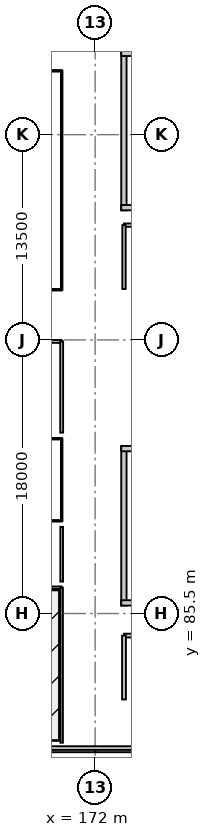
"""IFC4 building model, lengths in metres.
Left out: names, types, materials, properties, quantities, classifications, styles, units other than length and angle.
Written with IfcOpenShell. Run it as: python <this file> out.ifc"""

import sys

from ifc_helpers import new_model, si_unit, direction, frame, frame_2d, origin, origin_2d, place, context, subcontext, project, spatial, rectangle, i_section, extrude, element, fill, save


model = new_model("IFC4")
c1 = context("Model", 3, precision=1e-05, world=origin(), true_north=direction((0.0, 1.0)))
c2 = subcontext(c1, "Body", "Model", "MODEL_VIEW")
j1 = project(units=[si_unit("LENGTHUNIT", "METRE"), si_unit("PLANEANGLEUNIT", "RADIAN")], contexts=[c1])
p1 = place(None, origin())
s1 = spatial("IfcSite", under=j1, at=p1, CompositionType="ELEMENT")
p2 = place(p1, origin())
s2 = spatial("IfcBuilding", under=s1, at=p2, CompositionType="ELEMENT")
p3 = place(p2, frame((0.0, 0.0, 20.8)))
s3 = spatial("IfcBuildingStorey", under=s2, at=p3, CompositionType="ELEMENT", Elevation=20.8)
for number, where, z_axis, x_axis in (
    (1, (172.0, 76.5, 0.0), (0.0, 0.0, 1.0), (1.0, 0.0, 0.0)),
    (2, (172.0, 85.5, 0.0), (0.0, 0.0, 1.0), (1.0, 0.0, 0.0)),
    (3, (172.0, 94.5, 0.0), (0.0, 0.0, 1.0), (1.0, 0.0, 0.0)),
    (4, (172.0, 103.5, 0.0), (0.0, 0.0, 1.0), (1.0, 0.0, 0.0)),
    (5, (172.0, 117.0, 0.0), (0.0, 0.0, 1.0), (1.0, 0.0, 0.0)),
):
    element("IfcColumn", number, at=place(p3, frame(where, z_axis=z_axis, x_axis=x_axis)), inside=s3, PredefinedType="COLUMN", context=c2, shape_type="SweptSolid", body=[
        extrude(i_section(OverallWidth=0.3, OverallDepth=0.3, WebThickness=0.01, FlangeThickness=0.015, FilletRadius=0.018, at=origin_2d()), origin(), (0.0, 0.0, 1.0), 2.85),
    ])
p4 = place(p3, frame((179.995, 76.5, 0.0), z_axis=(0.0, 0.0, 1.0), x_axis=(-1.0, 0.0, 0.0)))
e6 = element("IfcWall", 6, at=p4, inside=s3, PredefinedType="SOLIDWALL", context=c2, shape_type="SweptSolid", body=[
    extrude(rectangle(XDim=7.99, YDim=0.245, at=frame_2d((3.995, 0.0))), origin(), (0.0, 0.0, 1.0), 2.23),
])
p5 = place(p4, frame((3.42, 0.0, 0.7)))
e7 = element("IfcOpeningElement", 7, at=p5, cuts=e6, PredefinedType="OPENING", context=c2, shape_type="SweptSolid", body=[
    extrude(rectangle(XDim=1.15, YDim=1.45, at=frame_2d((0.575, 0.725))), frame((0.0, 0.133, 0.0), z_axis=(0.0, -1.0, 0.0), x_axis=(1.0, 0.0, 0.0)), (0.0, 0.0, 1.0), 0.265),
])
p6 = place(p3, frame((171.995, 76.5, 0.0), z_axis=(0.0, 0.0, 1.0), x_axis=(-1.0, 0.0, 0.0)))
e8 = element("IfcWall", 8, at=p6, inside=s3, PredefinedType="SOLIDWALL", context=c2, shape_type="SweptSolid", body=[
    extrude(rectangle(XDim=8.99, YDim=0.245, at=frame_2d((4.495, 0.0))), origin(), (0.0, 0.0, 1.0), 2.23),
])
p7 = place(p6, frame((1.86, 0.0, 0.7)))
e9 = element("IfcOpeningElement", 9, at=p7, cuts=e8, PredefinedType="OPENING", context=c2, shape_type="SweptSolid", body=[
    extrude(rectangle(XDim=1.15, YDim=1.45, at=frame_2d((0.575, 0.725))), frame((0.0, 0.133, 0.0), z_axis=(0.0, -1.0, 0.0), x_axis=(1.0, 0.0, 0.0)), (0.0, 0.0, 1.0), 0.265),
])
p8 = place(p6, frame((5.98, 0.0, 0.7)))
e10 = element("IfcOpeningElement", 10, at=p8, cuts=e8, PredefinedType="OPENING", context=c2, shape_type="SweptSolid", body=[
    extrude(rectangle(XDim=1.15, YDim=1.45, at=frame_2d((0.575, 0.725))), frame((0.0, 0.133, 0.0), z_axis=(0.0, -1.0, 0.0), x_axis=(1.0, 0.0, 0.0)), (0.0, 0.0, 1.0), 0.265),
])
p9 = place(p3, frame((163.15, 76.65, 2.85), z_axis=(0.0, 0.0, 1.0), x_axis=(1.0, 0.0, 0.0)))
e11 = element("IfcWall", 11, at=p9, inside=s3, PredefinedType="PARAPET", context=c2, shape_type="SweptSolid", body=[
    extrude(rectangle(XDim=24.7, YDim=0.24, at=frame_2d((12.35, 0.0))), origin(), (0.0, 0.0, 1.0), 0.34),
])
p10 = place(p3, frame((173.893, 96.522, 0.0), z_axis=(0.0, 0.0, 1.0), x_axis=(0.0, -1.0, 0.0)))
e12 = element("IfcWall", 12, at=p10, inside=s3, PredefinedType="SHEAR", context=c2, shape_type="SweptSolid", body=[
    extrude(rectangle(XDim=10.498, YDim=0.35, at=frame_2d((5.249, 0.0))), origin(), (0.0, 0.0, 1.0), 2.645),
])
p11 = place(p3, frame((178.038, 96.347, 0.0), z_axis=(0.0, 0.0, 1.0), x_axis=(-1.0, 0.0, 0.0)))
e13 = element("IfcWall", 13, at=p11, inside=s3, PredefinedType="SHEAR", context=c2, shape_type="SweptSolid", body=[
    extrude(rectangle(XDim=4.32, YDim=0.35, at=frame_2d((2.16, 0.0))), origin(), (0.0, 0.0, 1.0), 2.645),
])
p12 = place(p3, frame((173.718, 86.2, 0.0), z_axis=(0.0, 0.0, 1.0), x_axis=(1.0, 0.0, 0.0)))
e14 = element("IfcWall", 14, at=p12, inside=s3, PredefinedType="SHEAR", context=c2, shape_type="SweptSolid", body=[
    extrude(rectangle(XDim=4.32, YDim=0.35, at=frame_2d((2.16, 0.0))), origin(), (0.0, 0.0, 1.0), 2.645),
])
p13 = place(p12, frame((1.15, 0.0, 0.0)))
e15 = element("IfcOpeningElement", 15, at=p13, cuts=e14, PredefinedType="OPENING", context=c2, shape_type="SweptSolid", body=[
    extrude(rectangle(XDim=1.3, YDim=2.1, at=frame_2d((0.65, 1.05))), frame((0.0, 0.185, 0.0), z_axis=(0.0, -1.0, 0.0), x_axis=(1.0, 0.0, 0.0)), (0.0, 0.0, 1.0), 0.37),
])
p14 = place(p3, frame((173.893, 122.522, 0.0), z_axis=(0.0, 0.0, 1.0), x_axis=(0.0, -1.0, 0.0)))
e16 = element("IfcWall", 16, at=p14, inside=s3, PredefinedType="SHEAR", context=c2, shape_type="SweptSolid", body=[
    extrude(rectangle(XDim=10.498, YDim=0.35, at=frame_2d((5.249, 0.0))), origin(), (0.0, 0.0, 1.0), 2.645),
])
p15 = place(p3, frame((178.038, 122.347, 0.0), z_axis=(0.0, 0.0, 1.0), x_axis=(-1.0, 0.0, 0.0)))
e17 = element("IfcWall", 17, at=p15, inside=s3, PredefinedType="SHEAR", context=c2, shape_type="SweptSolid", body=[
    extrude(rectangle(XDim=4.32, YDim=0.35, at=frame_2d((2.16, 0.0))), origin(), (0.0, 0.0, 1.0), 2.645),
])
p16 = place(p3, frame((173.718, 112.2, 0.0), z_axis=(0.0, 0.0, 1.0), x_axis=(1.0, 0.0, 0.0)))
e18 = element("IfcWall", 18, at=p16, inside=s3, PredefinedType="SHEAR", context=c2, shape_type="SweptSolid", body=[
    extrude(rectangle(XDim=4.32, YDim=0.35, at=frame_2d((2.16, 0.0))), origin(), (0.0, 0.0, 1.0), 2.645),
])
p17 = place(p16, frame((1.15, 0.0, 0.0)))
e19 = element("IfcOpeningElement", 19, at=p17, cuts=e18, PredefinedType="OPENING", context=c2, shape_type="SweptSolid", body=[
    extrude(rectangle(XDim=1.3, YDim=2.1, at=frame_2d((0.65, 1.05))), frame((0.0, 0.185, 0.0), z_axis=(0.0, -1.0, 0.0), x_axis=(1.0, 0.0, 0.0)), (0.0, 0.0, 1.0), 0.37),
])
p18 = place(p3, frame((169.8, 106.8, 0.0), z_axis=(0.0, 0.0, 1.0), x_axis=(-1.0, 0.0, 0.0)))
e20 = element("IfcWall", 20, at=p18, inside=s3, PredefinedType="PARTITIONING", context=c2, shape_type="SweptSolid", body=[
    extrude(rectangle(XDim=6.2, YDim=0.1, at=frame_2d((3.1, 0.0))), origin(), (0.0, 0.0, 1.0), 2.18),
])
p19 = place(p3, frame((163.6, 121.2, 0.0), z_axis=(0.0, 0.0, 1.0), x_axis=(1.0, 0.0, 0.0)))
e21 = element("IfcWall", 21, at=p19, inside=s3, PredefinedType="PARTITIONING", context=c2, shape_type="SweptSolid", body=[
    extrude(rectangle(XDim=6.2, YDim=0.1, at=frame_2d((3.1, 0.0))), origin(), (0.0, 0.0, 1.0), 2.23),
])
p20 = place(p3, frame((169.8, 121.2, 0.0), z_axis=(0.0, 0.0, 1.0), x_axis=(0.0, -1.0, 0.0)))
e22 = element("IfcWall", 22, at=p20, inside=s3, PredefinedType="PARTITIONING", context=c2, shape_type="SweptSolid", body=[
    extrude(rectangle(XDim=14.4, YDim=0.1, at=frame_2d((7.2, 0.0))), origin(), (0.0, 0.0, 1.0), 2.23),
])
p21 = place(p20, frame((6.575, 0.0, 0.0)))
e23 = element("IfcOpeningElement", 23, at=p21, cuts=e22, PredefinedType="OPENING", context=c2, shape_type="SweptSolid", body=[
    extrude(rectangle(XDim=1.25, YDim=2.1, at=frame_2d((0.625, 1.05))), frame((0.0, 0.06, 0.0), z_axis=(0.0, -1.0, 0.0), x_axis=(1.0, 0.0, 0.0)), (0.0, 0.0, 1.0), 0.12),
])
p22 = place(p20, frame((10.944, 0.0, 0.0)))
e24 = element("IfcOpeningElement", 24, at=p22, cuts=e22, PredefinedType="OPENING", context=c2, shape_type="SweptSolid", body=[
    extrude(rectangle(XDim=1.25, YDim=2.1, at=frame_2d((0.625, 1.05))), frame((0.0, 0.06, 0.0), z_axis=(0.0, -1.0, 0.0), x_axis=(1.0, 0.0, 0.0)), (0.0, 0.0, 1.0), 0.12),
])
p23 = place(p3, frame((163.4, 87.2, 0.0), z_axis=(0.0, 0.0, 1.0), x_axis=(1.0, 0.0, 0.0)))
e25 = element("IfcWall", 25, at=p23, inside=s3, PredefinedType="PARTITIONING", context=c2, shape_type="SweptSolid", body=[
    extrude(rectangle(XDim=6.4, YDim=0.16, at=frame_2d((3.2, 0.0))), origin(), (0.0, 0.0, 1.0), 2.23),
])
p24 = place(p3, frame((169.8, 87.2, 0.0), z_axis=(0.0, 0.0, 1.0), x_axis=(0.0, -1.0, 0.0)))
e26 = element("IfcWall", 26, at=p24, inside=s3, PredefinedType="PARTITIONING", context=c2, shape_type="SweptSolid", body=[
    extrude(rectangle(XDim=10.2, YDim=0.16, at=frame_2d((5.1, 0.0))), origin(), (0.0, 0.0, 1.0), 2.23),
])
p25 = place(p24, frame((4.575, 0.0, 0.0)))
e27 = element("IfcOpeningElement", 27, at=p25, cuts=e26, PredefinedType="OPENING", context=c2, shape_type="SweptSolid", body=[
    extrude(rectangle(XDim=1.05, YDim=2.1, at=frame_2d((0.525, 1.05))), frame((0.0, 0.09, 0.0), z_axis=(0.0, -1.0, 0.0), x_axis=(1.0, 0.0, 0.0)), (0.0, 0.0, 1.0), 0.18),
])
for number, where, z_axis, x_axis in (
    (28, (169.8, 91.6, 0.0), (0.0, 0.0, 1.0), (-1.0, 0.0, 0.0)),
    (29, (163.4, 97.0, 0.0), (0.0, 0.0, 1.0), (1.0, 0.0, 0.0)),
):
    element("IfcWall", number, at=place(p3, frame(where, z_axis=z_axis, x_axis=x_axis)), inside=s3, PredefinedType="PARTITIONING", context=c2, shape_type="SweptSolid", body=[
        extrude(rectangle(XDim=6.4, YDim=0.1, at=frame_2d((3.2, 0.0))), origin(), (0.0, 0.0, 1.0), 2.23),
    ])
p26 = place(p3, frame((169.8, 97.0, 0.0), z_axis=(0.0, 0.0, 1.0), x_axis=(0.0, -1.0, 0.0)))
e30 = element("IfcWall", 30, at=p26, inside=s3, PredefinedType="PARTITIONING", context=c2, shape_type="SweptSolid", body=[
    extrude(rectangle(XDim=5.4, YDim=0.1, at=frame_2d((2.7, 0.0))), origin(), (0.0, 0.0, 1.0), 2.23),
])
p27 = place(p26, frame((2.25, 0.0, 0.0)))
e31 = element("IfcOpeningElement", 31, at=p27, cuts=e30, PredefinedType="OPENING", context=c2, shape_type="SweptSolid", body=[
    extrude(rectangle(XDim=0.9, YDim=2.1, at=frame_2d((0.45, 1.05))), frame((0.0, 0.06, 0.0), z_axis=(0.0, -1.0, 0.0), x_axis=(1.0, 0.0, 0.0)), (0.0, 0.0, 1.0), 0.12),
])
p28 = place(p3, frame((163.4, 103.4, 0.0), z_axis=(0.0, 0.0, 1.0), x_axis=(1.0, 0.0, 0.0)))
e32 = element("IfcWall", 32, at=p28, inside=s3, PredefinedType="PARTITIONING", context=c2, shape_type="SweptSolid", body=[
    extrude(rectangle(XDim=6.4, YDim=0.19, at=frame_2d((3.2, 0.0))), origin(), (0.0, 0.0, 1.0), 2.18),
])
p29 = place(p3, frame((169.8, 103.4, 0.0), z_axis=(0.0, 0.0, 1.0), x_axis=(0.0, -1.0, 0.0)))
e33 = element("IfcWall", 33, at=p29, inside=s3, PredefinedType="PARTITIONING", context=c2, shape_type="SweptSolid", body=[
    extrude(rectangle(XDim=6.0, YDim=0.19, at=frame_2d((3.0, 0.0))), origin(), (0.0, 0.0, 1.0), 2.23),
])
p30 = place(p29, frame((2.55, 0.0, 0.0)))
e34 = element("IfcOpeningElement", 34, at=p30, cuts=e33, PredefinedType="OPENING", context=c2, shape_type="SweptSolid", body=[
    extrude(rectangle(XDim=0.9, YDim=2.1, at=frame_2d((0.45, 1.05))), frame((0.0, 0.105, 0.0), z_axis=(0.0, -1.0, 0.0), x_axis=(1.0, 0.0, 0.0)), (0.0, 0.0, 1.0), 0.21),
])
p31 = place(p3, frame((169.8, 91.2, 0.0), z_axis=(0.0, 0.0, 1.0), x_axis=(0.0, -1.0, 0.0)))
e35 = element("IfcWall", 35, at=p31, inside=s3, PredefinedType="PARTITIONING", context=c2, shape_type="SweptSolid", body=[
    extrude(rectangle(XDim=3.6, YDim=0.175, at=frame_2d((1.8, 0.0))), origin(), (0.0, 0.0, 1.0), 2.62),
])
p32 = place(p31, frame((1.29, 0.0, 0.0)))
e36 = element("IfcOpeningElement", 36, at=p32, cuts=e35, PredefinedType="OPENING", context=c2, shape_type="SweptSolid", body=[
    extrude(rectangle(XDim=1.02, YDim=2.05, at=frame_2d((0.51, 1.025))), frame((0.0, 0.097, 0.0), z_axis=(0.0, -1.0, 0.0), x_axis=(1.0, 0.0, 0.0)), (0.0, 0.0, 1.0), 0.195),
])
p33 = place(p3, frame((173.9, 84.05, 0.0), z_axis=(0.0, 0.0, 1.0), x_axis=(1.0, 0.0, 0.0)))
e37 = element("IfcWall", 37, at=p33, inside=s3, PredefinedType="SOLIDWALL", context=c2, shape_type="SweptSolid", body=[
    extrude(rectangle(XDim=4.0, YDim=0.25, at=frame_2d((2.0, 0.0))), origin(), (0.0, 0.0, 1.0), 2.62),
])
p34 = place(p3, frame((173.9, 79.85, 0.0), z_axis=(0.0, 0.0, 1.0), x_axis=(0.0, 1.0, 0.0)))
e38 = element("IfcWall", 38, at=p34, inside=s3, PredefinedType="SOLIDWALL", context=c2, shape_type="SweptSolid", body=[
    extrude(rectangle(XDim=4.2, YDim=0.25, at=frame_2d((2.1, 0.0))), origin(), (0.0, 0.0, 1.0), 2.62),
])
p35 = place(p34, frame((1.4, 0.0, 0.0)))
e39 = element("IfcOpeningElement", 39, at=p35, cuts=e38, PredefinedType="OPENING", context=c2, shape_type="SweptSolid", body=[
    extrude(rectangle(XDim=1.4, YDim=2.1, at=frame_2d((0.7, 1.05))), frame((0.0, 0.135, 0.0), z_axis=(0.0, -1.0, 0.0), x_axis=(1.0, 0.0, 0.0)), (0.0, 0.0, 1.0), 0.27),
])
p36 = place(p3, frame((173.9, 111.05, 0.0), z_axis=(0.0, 0.0, 1.0), x_axis=(1.0, 0.0, 0.0)))
e40 = element("IfcWall", 40, at=p36, inside=s3, PredefinedType="SOLIDWALL", context=c2, shape_type="SweptSolid", body=[
    extrude(rectangle(XDim=4.0, YDim=0.22, at=frame_2d((2.0, 0.0))), origin(), (0.0, 0.0, 1.0), 2.62),
])
p37 = place(p3, frame((173.9, 106.85, 0.0), z_axis=(0.0, 0.0, 1.0), x_axis=(0.0, 1.0, 0.0)))
e41 = element("IfcWall", 41, at=p37, inside=s3, PredefinedType="SOLIDWALL", context=c2, shape_type="SweptSolid", body=[
    extrude(rectangle(XDim=4.2, YDim=0.22, at=frame_2d((2.1, 0.0))), origin(), (0.0, 0.0, 1.0), 2.62),
])
p38 = place(p37, frame((1.4, 0.0, 0.0)))
e42 = element("IfcOpeningElement", 42, at=p38, cuts=e41, PredefinedType="OPENING", context=c2, shape_type="SweptSolid", body=[
    extrude(rectangle(XDim=1.4, YDim=2.1, at=frame_2d((0.7, 1.05))), frame((0.0, 0.12, 0.0), z_axis=(0.0, -1.0, 0.0), x_axis=(1.0, 0.0, 0.0)), (0.0, 0.0, 1.0), 0.24),
])
p39 = place(p7, origin())
e43 = element("IfcWindow", 43, at=p39, inside=s3, PartitioningType="SINGLE_PANEL", PredefinedType="WINDOW", context=c2, shape_type="SweptSolid", body=[
    extrude(rectangle(XDim=1.15, YDim=1.45, at=frame_2d((0.575, 0.725))), frame((0.0, 0.03, 0.0), z_axis=(0.0, -1.0, 0.0), x_axis=(1.0, 0.0, 0.0)), (0.0, 0.0, 1.0), 0.06),
])
fill(e9, e43)
p40 = place(p21, origin())
e44 = element("IfcDoor", 44, at=p40, inside=s3, OperationType="SINGLE_SWING_RIGHT", PredefinedType="DOOR", context=c2, shape_type="SweptSolid", body=[
    extrude(rectangle(XDim=1.25, YDim=2.1, at=frame_2d((0.625, 1.05))), frame((0.0, 0.025, 0.0), z_axis=(0.0, -1.0, 0.0), x_axis=(1.0, 0.0, 0.0)), (0.0, 0.0, 1.0), 0.05),
])
fill(e23, e44)
p41 = place(p22, origin())
e45 = element("IfcDoor", 45, at=p41, inside=s3, OperationType="SINGLE_SWING_LEFT", PredefinedType="DOOR", context=c2, shape_type="SweptSolid", body=[
    extrude(rectangle(XDim=1.25, YDim=2.1, at=frame_2d((0.625, 1.05))), frame((0.0, 0.025, 0.0), z_axis=(0.0, -1.0, 0.0), x_axis=(1.0, 0.0, 0.0)), (0.0, 0.0, 1.0), 0.05),
])
fill(e24, e45)
p42 = place(p25, origin())
e46 = element("IfcDoor", 46, at=p42, inside=s3, OperationType="SINGLE_SWING_RIGHT", PredefinedType="DOOR", context=c2, shape_type="SweptSolid", body=[
    extrude(rectangle(XDim=1.05, YDim=2.1, at=frame_2d((0.525, 1.05))), frame((0.0, 0.025, 0.0), z_axis=(0.0, -1.0, 0.0), x_axis=(1.0, 0.0, 0.0)), (0.0, 0.0, 1.0), 0.05),
])
fill(e27, e46)
p43 = place(p27, origin())
e47 = element("IfcDoor", 47, at=p43, inside=s3, OperationType="SINGLE_SWING_RIGHT", PredefinedType="DOOR", context=c2, shape_type="SweptSolid", body=[
    extrude(rectangle(XDim=0.9, YDim=2.1, at=frame_2d((0.45, 1.05))), frame((0.0, 0.025, 0.0), z_axis=(0.0, -1.0, 0.0), x_axis=(1.0, 0.0, 0.0)), (0.0, 0.0, 1.0), 0.05),
])
fill(e31, e47)
p44 = place(p30, origin())
e48 = element("IfcDoor", 48, at=p44, inside=s3, OperationType="SINGLE_SWING_LEFT", PredefinedType="DOOR", context=c2, shape_type="SweptSolid", body=[
    extrude(rectangle(XDim=0.9, YDim=2.1, at=frame_2d((0.45, 1.05))), frame((0.0, 0.025, 0.0), z_axis=(0.0, -1.0, 0.0), x_axis=(1.0, 0.0, 0.0)), (0.0, 0.0, 1.0), 0.05),
])
fill(e34, e48)
p45 = place(p32, origin())
e49 = element("IfcDoor", 49, at=p45, inside=s3, OperationType="SINGLE_SWING_RIGHT", PredefinedType="DOOR", context=c2, shape_type="SweptSolid", body=[
    extrude(rectangle(XDim=1.02, YDim=2.05, at=frame_2d((0.51, 1.025))), frame((0.0, 0.025, 0.0), z_axis=(0.0, -1.0, 0.0), x_axis=(1.0, 0.0, 0.0)), (0.0, 0.0, 1.0), 0.05),
])
fill(e36, e49)
p46 = place(p35, origin())
e50 = element("IfcDoor", 50, at=p46, inside=s3, OperationType="SINGLE_SWING_RIGHT", PredefinedType="DOOR", context=c2, shape_type="SweptSolid", body=[
    extrude(rectangle(XDim=1.4, YDim=2.1, at=frame_2d((0.7, 1.05))), frame((0.0, 0.025, 0.0), z_axis=(0.0, -1.0, 0.0), x_axis=(1.0, 0.0, 0.0)), (0.0, 0.0, 1.0), 0.05),
])
fill(e39, e50)
p47 = place(p38, origin())
e51 = element("IfcDoor", 51, at=p47, inside=s3, OperationType="SINGLE_SWING_LEFT", PredefinedType="DOOR", context=c2, shape_type="SweptSolid", body=[
    extrude(rectangle(XDim=1.4, YDim=2.1, at=frame_2d((0.7, 1.05))), frame((0.0, 0.025, 0.0), z_axis=(0.0, -1.0, 0.0), x_axis=(1.0, 0.0, 0.0)), (0.0, 0.0, 1.0), 0.05),
])
fill(e42, e51)
save(model, sys.argv[1])
